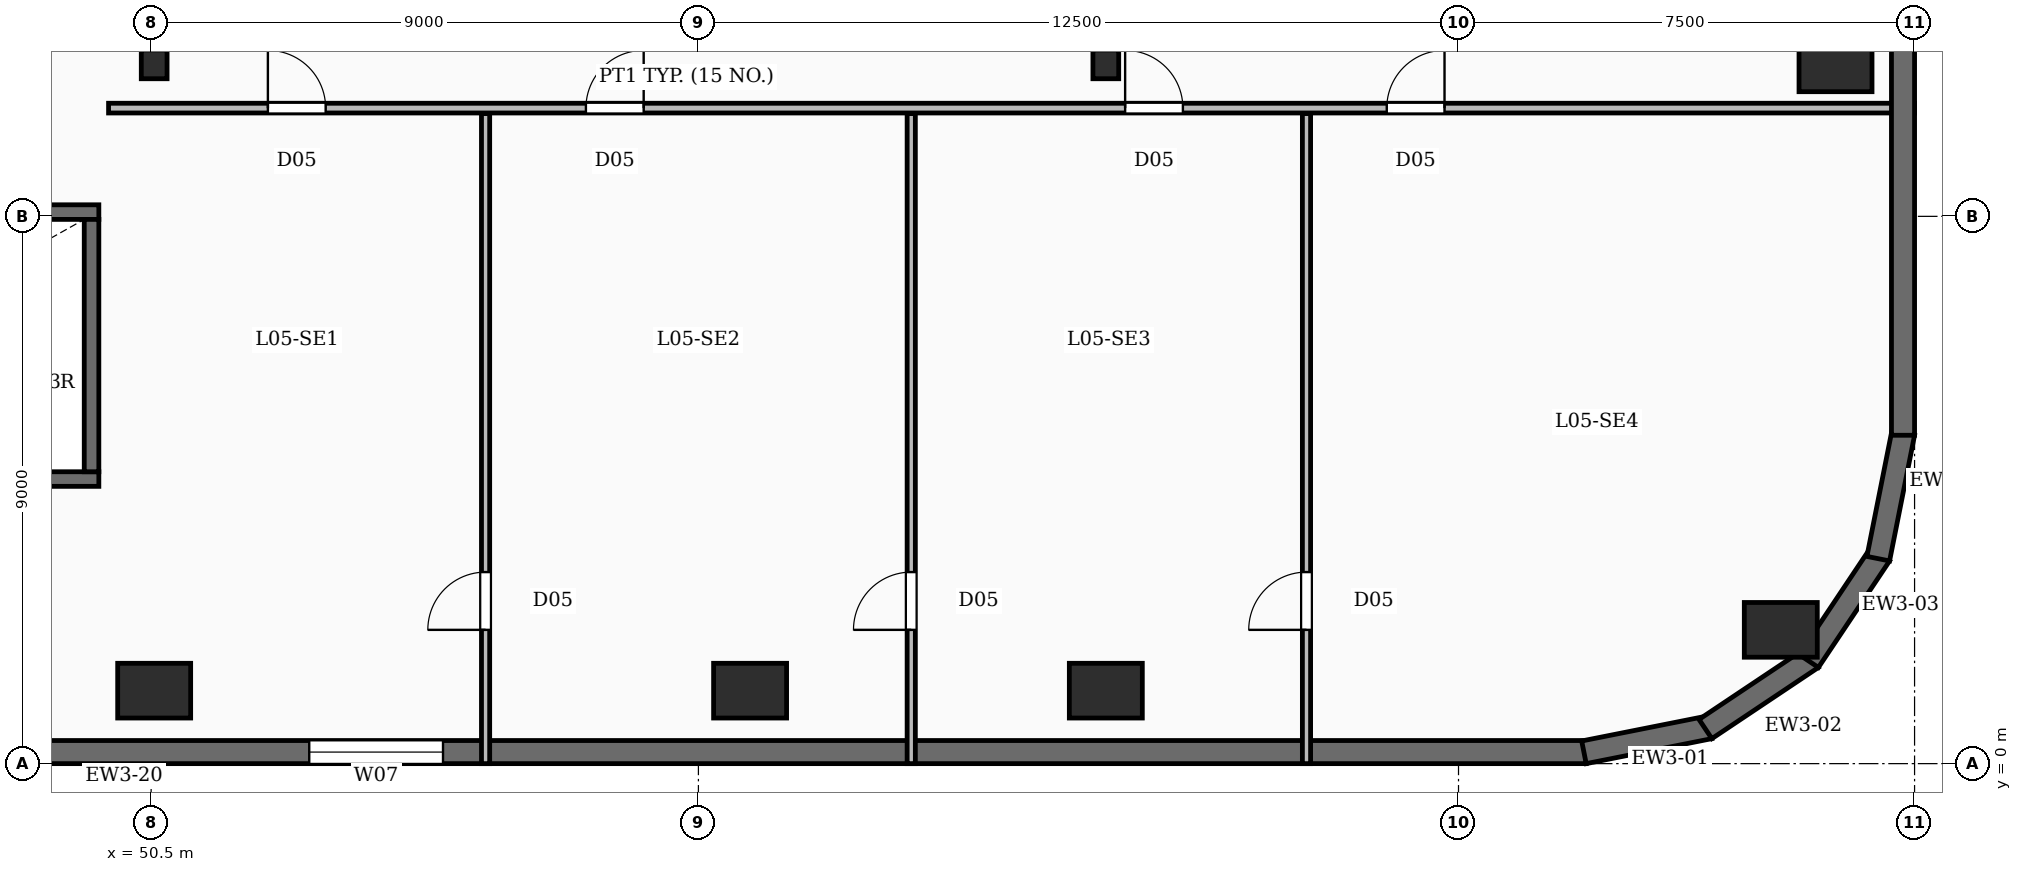
"""IFC4 building model, lengths in metres.
Left out: names, types, materials, properties, quantities, classifications, styles, units other than length and angle.
Written with IfcOpenShell. Run it as: python <this file> out.ifc"""

import sys

from ifc_helpers import new_model, si_unit, direction, frame, frame_2d, origin, origin_2d, place, context, subcontext, project, spatial, rectangle, i_section, extrude, element, fill, save


model = new_model("IFC4")
c1 = context("Model", 3, precision=1e-05, world=origin(), true_north=direction((0.0, 1.0)))
c2 = subcontext(c1, "Body", "Model", "MODEL_VIEW")
j1 = project(units=[si_unit("LENGTHUNIT", "METRE"), si_unit("PLANEANGLEUNIT", "RADIAN")], contexts=[c1])
p1 = place(None, origin())
s1 = spatial("IfcSite", under=j1, at=p1, CompositionType="ELEMENT")
p2 = place(p1, origin())
s2 = spatial("IfcBuilding", under=s1, at=p2, CompositionType="ELEMENT")
p3 = place(p2, frame((0.0, 0.0, 28.0)))
s3 = spatial("IfcBuildingStorey", under=s2, at=p3, CompositionType="ELEMENT", Elevation=28.0)
for number, where, z_axis, x_axis in (
    (1, (50.55, 1.2, -0.35), (0.0, 0.0, 1.0), (1.0, 0.0, 0.0)),
    (2, (60.35, 1.2, -0.35), (0.0, 0.0, 1.0), (1.0, 0.0, 0.0)),
    (3, (66.2, 1.2, -0.35), (0.0, 0.0, 1.0), (1.0, 0.0, 0.0)),
    (4, (77.3, 2.2, -0.35), (0.0, 0.0, 1.0), (1.0, 0.0, 0.0)),
    (5, (78.2, 11.5, -0.35), (0.0, 0.0, 1.0), (1.0, 0.0, 0.0)),
):
    element("IfcColumn", number, at=place(p3, frame(where, z_axis=z_axis, x_axis=x_axis)), inside=s3, PredefinedType="COLUMN", context=c2, shape_type="SweptSolid", body=[
        extrude(rectangle(XDim=1.2, YDim=0.9, at=origin_2d()), origin(), (0.0, 0.0, 1.0), 5.9),
    ])
for number, where, z_axis, x_axis in (
    (6, (50.55, 11.5, -0.35), (0.0, 0.0, 1.0), (1.0, 0.0, 0.0)),
    (7, (66.2, 11.5, -0.35), (0.0, 0.0, 1.0), (1.0, 0.0, 0.0)),
):
    element("IfcColumn", number, at=place(p3, frame(where, z_axis=z_axis, x_axis=x_axis)), inside=s3, PredefinedType="COLUMN", context=c2, shape_type="SweptSolid", body=[
        extrude(i_section(OverallWidth=0.424, OverallDepth=0.474, WebThickness=0.048, FlangeThickness=0.077, FilletRadius=0.02, at=origin_2d()), origin(), (0.0, 0.0, 1.0), 5.9),
    ])
for number, where, z_axis, x_axis in (
    (8, (76.129, 0.597, 0.0), (0.0, 0.0, 1.0), (-0.981, -0.195, 0.0)),
    (9, (77.813, 1.74, 0.0), (0.0, 0.0, 1.0), (-0.832, -0.556, 0.0)),
    (10, (78.931, 3.439, 0.0), (0.0, 0.0, 1.0), (-0.556, -0.832, 0.0)),
    (11, (79.314, 5.437, 0.0), (0.0, 0.0, 1.0), (-0.195, -0.981, 0.0)),
):
    element("IfcWall", number, at=place(p3, frame(where, z_axis=z_axis, x_axis=x_axis)), inside=s3, PredefinedType="SOLIDWALL", context=c2, shape_type="SweptSolid", body=[
        extrude(rectangle(XDim=2.107, YDim=0.38, at=frame_2d((1.053, 0.0))), origin(), (0.0, 0.0, 1.0), 5.55),
    ])
p4 = place(p3, frame((79.31, 49.1, 0.0), z_axis=(0.0, 0.0, 1.0), x_axis=(0.0, -1.0, 0.0)))
e12 = element("IfcWall", 12, at=p4, inside=s3, PredefinedType="SOLIDWALL", context=c2, shape_type="SweptSolid", body=[
    extrude(rectangle(XDim=43.7, YDim=0.38, at=frame_2d((21.85, 0.0))), origin(), (0.0, 0.0, 1.0), 5.55),
])
p5 = place(p4, frame((2.6, 0.0, 0.95)))
e13 = element("IfcOpeningElement", 13, at=p5, cuts=e12, PredefinedType="OPENING", context=c2, shape_type="SweptSolid", body=[
    extrude(rectangle(XDim=2.2, YDim=2.5, at=frame_2d((1.1, 1.25))), frame((0.0, 0.2, 0.0), z_axis=(0.0, -1.0, 0.0), x_axis=(1.0, 0.0, 0.0)), (0.0, 0.0, 1.0), 0.4),
])
p6 = place(p4, frame((8.0, 0.0, 0.95)))
e14 = element("IfcOpeningElement", 14, at=p6, cuts=e12, PredefinedType="OPENING", context=c2, shape_type="SweptSolid", body=[
    extrude(rectangle(XDim=2.2, YDim=2.5, at=frame_2d((1.1, 1.25))), frame((0.0, 0.2, 0.0), z_axis=(0.0, -1.0, 0.0), x_axis=(1.0, 0.0, 0.0)), (0.0, 0.0, 1.0), 0.4),
])
p7 = place(p4, frame((29.6, 0.0, 0.95)))
e15 = element("IfcOpeningElement", 15, at=p7, cuts=e12, PredefinedType="OPENING", context=c2, shape_type="SweptSolid", body=[
    extrude(rectangle(XDim=2.2, YDim=2.5, at=frame_2d((1.1, 1.25))), frame((0.0, 0.2, 0.0), z_axis=(0.0, -1.0, 0.0), x_axis=(1.0, 0.0, 0.0)), (0.0, 0.0, 1.0), 0.4),
])
p8 = place(p3, frame((74.1, 0.19, 0.0), z_axis=(0.0, 0.0, 1.0), x_axis=(-1.0, 0.0, 0.0)))
e16 = element("IfcWall", 16, at=p8, inside=s3, PredefinedType="SOLIDWALL", context=c2, shape_type="SweptSolid", body=[
    extrude(rectangle(XDim=68.7, YDim=0.38, at=frame_2d((34.35, 0.0))), origin(), (0.0, 0.0, 1.0), 5.55),
])
p9 = place(p8, frame((53.4, 0.0, 0.0)))
e17 = element("IfcOpeningElement", 17, at=p9, cuts=e16, PredefinedType="OPENING", context=c2, shape_type="SweptSolid", body=[
    extrude(rectangle(XDim=1.8, YDim=2.25, at=frame_2d((0.9, 1.125))), frame((0.0, 0.2, 0.0), z_axis=(0.0, -1.0, 0.0), x_axis=(1.0, 0.0, 0.0)), (0.0, 0.0, 1.0), 0.4),
])
p10 = place(p8, frame((18.8, 0.0, 0.95)))
e18 = element("IfcOpeningElement", 18, at=p10, cuts=e16, PredefinedType="OPENING", context=c2, shape_type="SweptSolid", body=[
    extrude(rectangle(XDim=2.2, YDim=2.5, at=frame_2d((1.1, 1.25))), frame((0.0, 0.2, 0.0), z_axis=(0.0, -1.0, 0.0), x_axis=(1.0, 0.0, 0.0)), (0.0, 0.0, 1.0), 0.4),
])
p11 = place(p8, frame((29.6, 0.0, 0.95)))
e19 = element("IfcOpeningElement", 19, at=p11, cuts=e16, PredefinedType="OPENING", context=c2, shape_type="SweptSolid", body=[
    extrude(rectangle(XDim=2.2, YDim=2.5, at=frame_2d((1.1, 1.25))), frame((0.0, 0.2, 0.0), z_axis=(0.0, -1.0, 0.0), x_axis=(1.0, 0.0, 0.0)), (0.0, 0.0, 1.0), 0.4),
])
p12 = place(p8, frame((40.4, 0.0, 0.95)))
e20 = element("IfcOpeningElement", 20, at=p12, cuts=e16, PredefinedType="OPENING", context=c2, shape_type="SweptSolid", body=[
    extrude(rectangle(XDim=2.2, YDim=2.5, at=frame_2d((1.1, 1.25))), frame((0.0, 0.2, 0.0), z_axis=(0.0, -1.0, 0.0), x_axis=(1.0, 0.0, 0.0)), (0.0, 0.0, 1.0), 0.4),
])
p13 = place(p8, frame((45.8, 0.0, 0.95)))
e21 = element("IfcOpeningElement", 21, at=p13, cuts=e16, PredefinedType="OPENING", context=c2, shape_type="SweptSolid", body=[
    extrude(rectangle(XDim=2.2, YDim=2.5, at=frame_2d((1.1, 1.25))), frame((0.0, 0.2, 0.0), z_axis=(0.0, -1.0, 0.0), x_axis=(1.0, 0.0, 0.0)), (0.0, 0.0, 1.0), 0.4),
])
p14 = place(p8, frame((56.6, 0.0, 0.95)))
e22 = element("IfcOpeningElement", 22, at=p14, cuts=e16, PredefinedType="OPENING", context=c2, shape_type="SweptSolid", body=[
    extrude(rectangle(XDim=2.2, YDim=2.5, at=frame_2d((1.1, 1.25))), frame((0.0, 0.2, 0.0), z_axis=(0.0, -1.0, 0.0), x_axis=(1.0, 0.0, 0.0)), (0.0, 0.0, 1.0), 0.4),
])
p15 = place(p8, frame((62.0, 0.0, 0.95)))
e23 = element("IfcOpeningElement", 23, at=p15, cuts=e16, PredefinedType="OPENING", context=c2, shape_type="SweptSolid", body=[
    extrude(rectangle(XDim=2.2, YDim=2.5, at=frame_2d((1.1, 1.25))), frame((0.0, 0.2, 0.0), z_axis=(0.0, -1.0, 0.0), x_axis=(1.0, 0.0, 0.0)), (0.0, 0.0, 1.0), 0.4),
])
p16 = place(p3, frame((39.76, 9.07, 0.0), z_axis=(0.0, 0.0, 1.0), x_axis=(1.0, 0.0, 0.0)))
e24 = element("IfcWall", 24, at=p16, inside=s3, PredefinedType="SOLIDWALL", context=c2, shape_type="SweptSolid", body=[
    extrude(rectangle(XDim=9.88, YDim=0.24, at=frame_2d((4.94, 0.0))), origin(), (0.0, 0.0, 1.0), 5.55),
])
p17 = place(p16, frame((0.69, 0.0, 0.0)))
e25 = element("IfcOpeningElement", 25, at=p17, cuts=e24, PredefinedType="OPENING", context=c2, shape_type="SweptSolid", body=[
    extrude(rectangle(XDim=1.1, YDim=2.15, at=frame_2d((0.55, 1.075))), frame((0.0, 0.13, 0.0), z_axis=(0.0, -1.0, 0.0), x_axis=(1.0, 0.0, 0.0)), (0.0, 0.0, 1.0), 0.26),
])
p18 = place(p3, frame((39.76, 4.68, 0.0), z_axis=(0.0, 0.0, 1.0), x_axis=(1.0, 0.0, 0.0)))
e26 = element("IfcWall", 26, at=p18, inside=s3, PredefinedType="SOLIDWALL", context=c2, shape_type="SweptSolid", body=[
    extrude(rectangle(XDim=9.88, YDim=0.24, at=frame_2d((4.94, 0.0))), origin(), (0.0, 0.0, 1.0), 5.55),
])
p19 = place(p3, frame((49.52, 4.8, 0.0), z_axis=(0.0, 0.0, 1.0), x_axis=(0.0, 1.0, 0.0)))
e27 = element("IfcWall", 27, at=p19, inside=s3, PredefinedType="SOLIDWALL", context=c2, shape_type="SweptSolid", body=[
    extrude(rectangle(XDim=4.15, YDim=0.24, at=frame_2d((2.075, 0.0))), origin(), (0.0, 0.0, 1.0), 5.55),
])
p20 = place(p3, frame((56.0, 0.0, 0.0), z_axis=(0.0, 0.0, 1.0), x_axis=(0.0, 1.0, 0.0)))
e28 = element("IfcWall", 28, at=p20, inside=s3, PredefinedType="PARTITIONING", context=c2, shape_type="SweptSolid", body=[
    extrude(rectangle(XDim=10.69, YDim=0.135, at=frame_2d((5.345, 0.0))), origin(), (0.0, 0.0, 1.0), 4.61),
])
p21 = place(p20, frame((2.2, 0.0, 0.0)))
e29 = element("IfcOpeningElement", 29, at=p21, cuts=e28, PredefinedType="OPENING", context=c2, shape_type="SweptSolid", body=[
    extrude(rectangle(XDim=0.95, YDim=2.15, at=frame_2d((0.475, 1.075))), frame((0.0, 0.077, 0.0), z_axis=(0.0, -1.0, 0.0), x_axis=(1.0, 0.0, 0.0)), (0.0, 0.0, 1.0), 0.155),
])
p22 = place(p3, frame((63.0, 0.0, 0.0), z_axis=(0.0, 0.0, 1.0), x_axis=(0.0, 1.0, 0.0)))
e30 = element("IfcWall", 30, at=p22, inside=s3, PredefinedType="PARTITIONING", context=c2, shape_type="SweptSolid", body=[
    extrude(rectangle(XDim=10.69, YDim=0.135, at=frame_2d((5.345, 0.0))), origin(), (0.0, 0.0, 1.0), 4.61),
])
p23 = place(p22, frame((2.2, 0.0, 0.0)))
e31 = element("IfcOpeningElement", 31, at=p23, cuts=e30, PredefinedType="OPENING", context=c2, shape_type="SweptSolid", body=[
    extrude(rectangle(XDim=0.95, YDim=2.15, at=frame_2d((0.475, 1.075))), frame((0.0, 0.077, 0.0), z_axis=(0.0, -1.0, 0.0), x_axis=(1.0, 0.0, 0.0)), (0.0, 0.0, 1.0), 0.155),
])
p24 = place(p3, frame((69.5, 0.0, 0.0), z_axis=(0.0, 0.0, 1.0), x_axis=(0.0, 1.0, 0.0)))
e32 = element("IfcWall", 32, at=p24, inside=s3, PredefinedType="PARTITIONING", context=c2, shape_type="SweptSolid", body=[
    extrude(rectangle(XDim=10.69, YDim=0.135, at=frame_2d((5.345, 0.0))), origin(), (0.0, 0.0, 1.0), 4.61),
])
p25 = place(p24, frame((2.2, 0.0, 0.0)))
e33 = element("IfcOpeningElement", 33, at=p25, cuts=e32, PredefinedType="OPENING", context=c2, shape_type="SweptSolid", body=[
    extrude(rectangle(XDim=0.95, YDim=2.15, at=frame_2d((0.475, 1.075))), frame((0.0, 0.077, 0.0), z_axis=(0.0, -1.0, 0.0), x_axis=(1.0, 0.0, 0.0)), (0.0, 0.0, 1.0), 0.155),
])
p26 = place(p3, frame((49.8, 10.78, 0.0), z_axis=(0.0, 0.0, 1.0), x_axis=(1.0, 0.0, 0.0)))
e34 = element("IfcWall", 34, at=p26, inside=s3, PredefinedType="PARTITIONING", context=c2, shape_type="SweptSolid", body=[
    extrude(rectangle(XDim=29.7, YDim=0.16, at=frame_2d((14.85, 0.0))), origin(), (0.0, 0.0, 1.0), 4.61),
])
p27 = place(p26, frame((2.62, 0.0, 0.0)))
e35 = element("IfcOpeningElement", 35, at=p27, cuts=e34, PredefinedType="OPENING", context=c2, shape_type="SweptSolid", body=[
    extrude(rectangle(XDim=0.95, YDim=2.15, at=frame_2d((0.475, 1.075))), frame((0.0, 0.09, 0.0), z_axis=(0.0, -1.0, 0.0), x_axis=(1.0, 0.0, 0.0)), (0.0, 0.0, 1.0), 0.18),
])
p28 = place(p26, frame((7.85, 0.0, 0.0)))
e36 = element("IfcOpeningElement", 36, at=p28, cuts=e34, PredefinedType="OPENING", context=c2, shape_type="SweptSolid", body=[
    extrude(rectangle(XDim=0.95, YDim=2.15, at=frame_2d((0.475, 1.075))), frame((0.0, 0.09, 0.0), z_axis=(0.0, -1.0, 0.0), x_axis=(1.0, 0.0, 0.0)), (0.0, 0.0, 1.0), 0.18),
])
p29 = place(p26, frame((16.718, 0.0, 0.0)))
e37 = element("IfcOpeningElement", 37, at=p29, cuts=e34, PredefinedType="OPENING", context=c2, shape_type="SweptSolid", body=[
    extrude(rectangle(XDim=0.95, YDim=2.15, at=frame_2d((0.475, 1.075))), frame((0.0, 0.09, 0.0), z_axis=(0.0, -1.0, 0.0), x_axis=(1.0, 0.0, 0.0)), (0.0, 0.0, 1.0), 0.18),
])
p30 = place(p26, frame((21.02, 0.0, 0.0)))
e38 = element("IfcOpeningElement", 38, at=p30, cuts=e34, PredefinedType="OPENING", context=c2, shape_type="SweptSolid", body=[
    extrude(rectangle(XDim=0.95, YDim=2.15, at=frame_2d((0.475, 1.075))), frame((0.0, 0.09, 0.0), z_axis=(0.0, -1.0, 0.0), x_axis=(1.0, 0.0, 0.0)), (0.0, 0.0, 1.0), 0.18),
])
p31 = place(p10, origin())
e39 = element("IfcWindow", 39, at=p31, inside=s3, PartitioningType="DOUBLE_PANEL_VERTICAL", PredefinedType="WINDOW", context=c2, shape_type="SweptSolid", body=[
    extrude(rectangle(XDim=2.2, YDim=2.5, at=frame_2d((1.1, 1.25))), frame((0.0, 0.03, 0.0), z_axis=(0.0, -1.0, 0.0), x_axis=(1.0, 0.0, 0.0)), (0.0, 0.0, 1.0), 0.06),
])
fill(e18, e39)
p32 = place(p21, origin())
e40 = element("IfcDoor", 40, at=p32, inside=s3, OperationType="SINGLE_SWING_LEFT", PredefinedType="DOOR", context=c2, shape_type="SweptSolid", body=[
    extrude(rectangle(XDim=0.95, YDim=2.15, at=frame_2d((0.475, 1.075))), frame((0.0, 0.025, 0.0), z_axis=(0.0, -1.0, 0.0), x_axis=(1.0, 0.0, 0.0)), (0.0, 0.0, 1.0), 0.05),
])
fill(e29, e40)
p33 = place(p23, origin())
e41 = element("IfcDoor", 41, at=p33, inside=s3, OperationType="SINGLE_SWING_LEFT", PredefinedType="DOOR", context=c2, shape_type="SweptSolid", body=[
    extrude(rectangle(XDim=0.95, YDim=2.15, at=frame_2d((0.475, 1.075))), frame((0.0, 0.025, 0.0), z_axis=(0.0, -1.0, 0.0), x_axis=(1.0, 0.0, 0.0)), (0.0, 0.0, 1.0), 0.05),
])
fill(e31, e41)
p34 = place(p25, origin())
e42 = element("IfcDoor", 42, at=p34, inside=s3, OperationType="SINGLE_SWING_LEFT", PredefinedType="DOOR", context=c2, shape_type="SweptSolid", body=[
    extrude(rectangle(XDim=0.95, YDim=2.15, at=frame_2d((0.475, 1.075))), frame((0.0, 0.025, 0.0), z_axis=(0.0, -1.0, 0.0), x_axis=(1.0, 0.0, 0.0)), (0.0, 0.0, 1.0), 0.05),
])
fill(e33, e42)
p35 = place(p27, origin())
e43 = element("IfcDoor", 43, at=p35, inside=s3, OperationType="SINGLE_SWING_LEFT", PredefinedType="DOOR", context=c2, shape_type="SweptSolid", body=[
    extrude(rectangle(XDim=0.95, YDim=2.15, at=frame_2d((0.475, 1.075))), frame((0.0, 0.025, 0.0), z_axis=(0.0, -1.0, 0.0), x_axis=(1.0, 0.0, 0.0)), (0.0, 0.0, 1.0), 0.05),
])
fill(e35, e43)
p36 = place(p28, origin())
e44 = element("IfcDoor", 44, at=p36, inside=s3, OperationType="SINGLE_SWING_RIGHT", PredefinedType="DOOR", context=c2, shape_type="SweptSolid", body=[
    extrude(rectangle(XDim=0.95, YDim=2.15, at=frame_2d((0.475, 1.075))), frame((0.0, 0.025, 0.0), z_axis=(0.0, -1.0, 0.0), x_axis=(1.0, 0.0, 0.0)), (0.0, 0.0, 1.0), 0.05),
])
fill(e36, e44)
p37 = place(p29, origin())
e45 = element("IfcDoor", 45, at=p37, inside=s3, OperationType="SINGLE_SWING_LEFT", PredefinedType="DOOR", context=c2, shape_type="SweptSolid", body=[
    extrude(rectangle(XDim=0.95, YDim=2.15, at=frame_2d((0.475, 1.075))), frame((0.0, 0.025, 0.0), z_axis=(0.0, -1.0, 0.0), x_axis=(1.0, 0.0, 0.0)), (0.0, 0.0, 1.0), 0.05),
])
fill(e37, e45)
p38 = place(p30, origin())
e46 = element("IfcDoor", 46, at=p38, inside=s3, OperationType="SINGLE_SWING_RIGHT", PredefinedType="DOOR", context=c2, shape_type="SweptSolid", body=[
    extrude(rectangle(XDim=0.95, YDim=2.15, at=frame_2d((0.475, 1.075))), frame((0.0, 0.025, 0.0), z_axis=(0.0, -1.0, 0.0), x_axis=(1.0, 0.0, 0.0)), (0.0, 0.0, 1.0), 0.05),
])
fill(e38, e46)
save(model, sys.argv[1])
